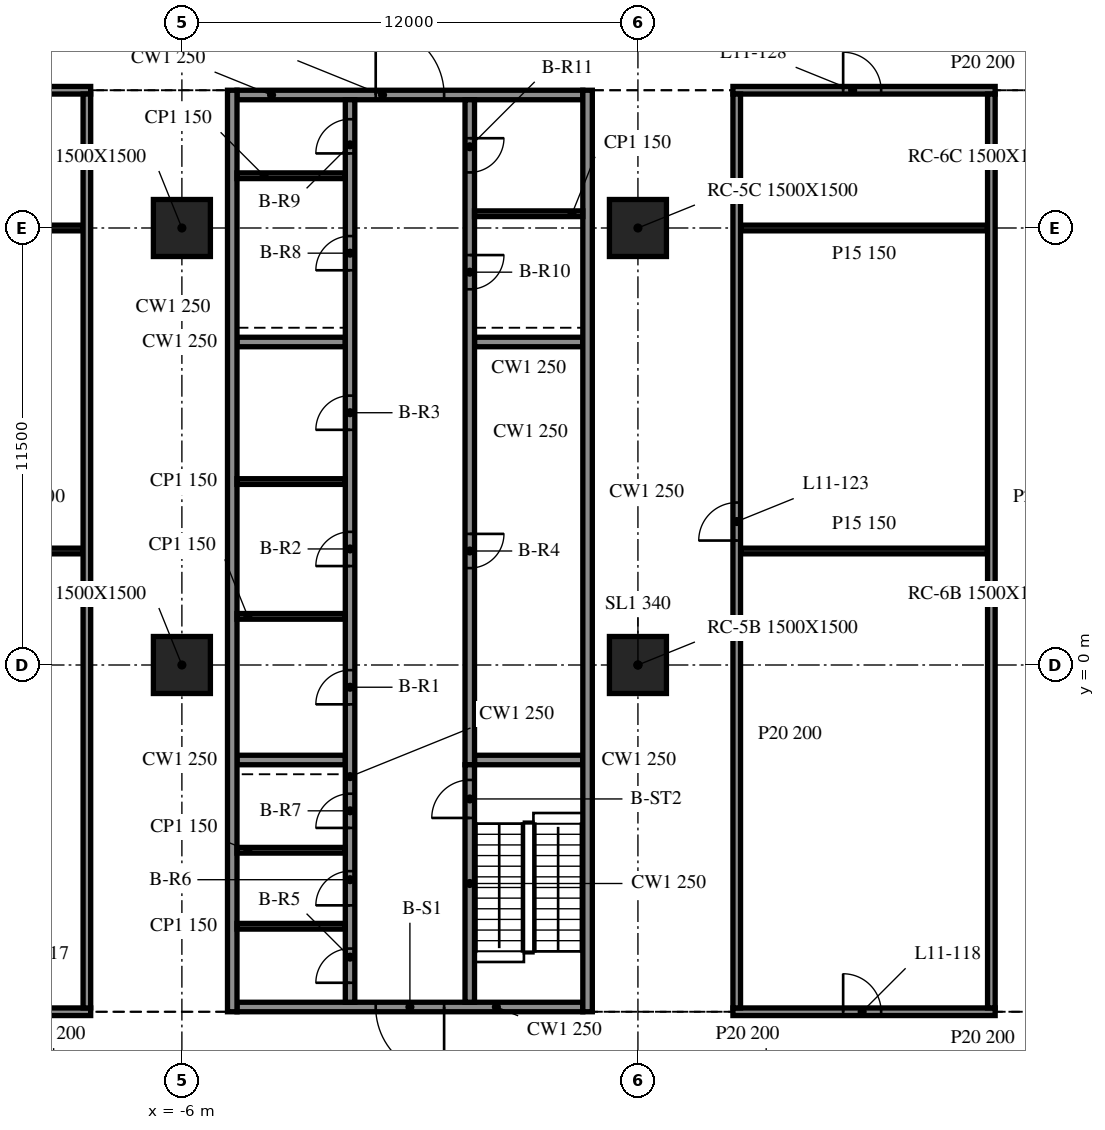
"""IFC4 building model, lengths in metres.
Left out: names, types, materials, properties, quantities, classifications, styles, units other than length and angle.
Written with IfcOpenShell. Run it as: python <this file> out.ifc"""

import sys

from ifc_helpers import new_model, si_unit, direction, frame, frame_2d, origin, origin_2d, place, context, subcontext, project, spatial, rectangle, extrude, element, fill, save


model = new_model("IFC4")
c1 = context("Model", 3, precision=1e-05, world=origin(), true_north=direction((0.0, 1.0)))
c2 = subcontext(c1, "Body", "Model", "MODEL_VIEW")
j1 = project(units=[si_unit("LENGTHUNIT", "METRE"), si_unit("PLANEANGLEUNIT", "RADIAN")], contexts=[c1])
p1 = place(None, origin())
s1 = spatial("IfcSite", under=j1, at=p1, CompositionType="ELEMENT")
p2 = place(p1, origin())
s2 = spatial("IfcBuilding", under=s1, at=p2, CompositionType="ELEMENT")
p3 = place(p2, frame((0.0, 0.0, 50.3)))
s3 = spatial("IfcBuildingStorey", under=s2, at=p3, CompositionType="ELEMENT", Elevation=50.3)
for number, where, z_axis, x_axis in (
    (1, (-6.0, 0.0, -0.34), (0.0, 0.0, 1.0), (1.0, 0.0, 0.0)),
    (2, (-6.0, 11.5, -0.34), (0.0, 0.0, 1.0), (1.0, 0.0, 0.0)),
    (3, (6.0, 0.0, -0.34), (0.0, 0.0, 1.0), (1.0, 0.0, 0.0)),
    (4, (6.0, 11.5, -0.34), (0.0, 0.0, 1.0), (1.0, 0.0, 0.0)),
):
    element("IfcColumn", number, at=place(p3, frame(where, z_axis=z_axis, x_axis=x_axis)), inside=s3, PredefinedType="COLUMN", context=c2, shape_type="SweptSolid", body=[
        extrude(rectangle(XDim=1.5, YDim=1.5, at=origin_2d()), origin(), (0.0, 0.0, 1.0), 4.3),
    ])
for number, where, z_axis, x_axis in (
    (5, (-4.675, 15.125, 0.0), (0.0, 0.0, 1.0), (0.0, -1.0, 0.0)),
    (6, (4.675, -9.125, 0.0), (0.0, 0.0, 1.0), (0.0, 1.0, 0.0)),
):
    element("IfcWall", number, at=place(p3, frame(where, z_axis=z_axis, x_axis=x_axis)), inside=s3, PredefinedType="SOLIDWALL", context=c2, shape_type="SweptSolid", body=[
        extrude(rectangle(XDim=24.25, YDim=0.25, at=frame_2d((12.125, 0.0))), origin(), (0.0, 0.0, 1.0), 3.96),
    ])
p4 = place(p3, frame((4.55, -9.0, 0.0), z_axis=(0.0, 0.0, 1.0), x_axis=(-1.0, 0.0, 0.0)))
e7 = element("IfcWall", 7, at=p4, inside=s3, PredefinedType="SOLIDWALL", context=c2, shape_type="SweptSolid", body=[
    extrude(rectangle(XDim=9.1, YDim=0.25, at=frame_2d((4.55, 0.0))), origin(), (0.0, 0.0, 1.0), 3.96),
])
p5 = place(p4, frame((3.65, 0.0, 0.0)))
e8 = element("IfcOpeningElement", 8, at=p5, cuts=e7, PredefinedType="OPENING", context=c2, shape_type="SweptSolid", body=[
    extrude(rectangle(XDim=1.8, YDim=2.1, at=frame_2d((0.9, 1.05))), frame((0.0, 0.135, 0.0), z_axis=(0.0, -1.0, 0.0), x_axis=(1.0, 0.0, 0.0)), (0.0, 0.0, 1.0), 0.27),
])
p6 = place(p3, frame((-4.55, 15.0, 0.0), z_axis=(0.0, 0.0, 1.0), x_axis=(1.0, 0.0, 0.0)))
e9 = element("IfcWall", 9, at=p6, inside=s3, PredefinedType="SOLIDWALL", context=c2, shape_type="SweptSolid", body=[
    extrude(rectangle(XDim=9.1, YDim=0.25, at=frame_2d((4.55, 0.0))), origin(), (0.0, 0.0, 1.0), 3.96),
])
p7 = place(p6, frame((3.65, 0.0, 0.0)))
e10 = element("IfcOpeningElement", 10, at=p7, cuts=e9, PredefinedType="OPENING", context=c2, shape_type="SweptSolid", body=[
    extrude(rectangle(XDim=1.8, YDim=2.1, at=frame_2d((0.9, 1.05))), frame((0.0, 0.135, 0.0), z_axis=(0.0, -1.0, 0.0), x_axis=(1.0, 0.0, 0.0)), (0.0, 0.0, 1.0), 0.27),
])
p8 = place(p3, frame((-1.575, -8.875, 0.0), z_axis=(0.0, 0.0, 1.0), x_axis=(0.0, 1.0, 0.0)))
e11 = element("IfcWall", 11, at=p8, inside=s3, PredefinedType="SOLIDWALL", context=c2, shape_type="SweptSolid", body=[
    extrude(rectangle(XDim=23.75, YDim=0.25, at=frame_2d((11.875, 0.0))), origin(), (0.0, 0.0, 1.0), 3.96),
])
p9 = place(p8, frame((7.84, 0.0, 0.0)))
e12 = element("IfcOpeningElement", 12, at=p9, cuts=e11, PredefinedType="OPENING", context=c2, shape_type="SweptSolid", body=[
    extrude(rectangle(XDim=0.9, YDim=2.1, at=frame_2d((0.45, 1.05))), frame((0.0, 0.135, 0.0), z_axis=(0.0, -1.0, 0.0), x_axis=(1.0, 0.0, 0.0)), (0.0, 0.0, 1.0), 0.27),
])
p10 = place(p8, frame((11.479, 0.0, 0.0)))
e13 = element("IfcOpeningElement", 13, at=p10, cuts=e11, PredefinedType="OPENING", context=c2, shape_type="SweptSolid", body=[
    extrude(rectangle(XDim=0.9, YDim=2.1, at=frame_2d((0.45, 1.05))), frame((0.0, 0.135, 0.0), z_axis=(0.0, -1.0, 0.0), x_axis=(1.0, 0.0, 0.0)), (0.0, 0.0, 1.0), 0.27),
])
p11 = place(p8, frame((15.064, 0.0, 0.0)))
e14 = element("IfcOpeningElement", 14, at=p11, cuts=e11, PredefinedType="OPENING", context=c2, shape_type="SweptSolid", body=[
    extrude(rectangle(XDim=0.9, YDim=2.1, at=frame_2d((0.45, 1.05))), frame((0.0, 0.135, 0.0), z_axis=(0.0, -1.0, 0.0), x_axis=(1.0, 0.0, 0.0)), (0.0, 0.0, 1.0), 0.27),
])
p12 = place(p8, frame((0.512, 0.0, 0.0)))
e15 = element("IfcOpeningElement", 15, at=p12, cuts=e11, PredefinedType="OPENING", context=c2, shape_type="SweptSolid", body=[
    extrude(rectangle(XDim=0.9, YDim=2.1, at=frame_2d((0.45, 1.05))), frame((0.0, 0.135, 0.0), z_axis=(0.0, -1.0, 0.0), x_axis=(1.0, 0.0, 0.0)), (0.0, 0.0, 1.0), 0.27),
])
p13 = place(p8, frame((2.55, 0.0, 0.0)))
e16 = element("IfcOpeningElement", 16, at=p13, cuts=e11, PredefinedType="OPENING", context=c2, shape_type="SweptSolid", body=[
    extrude(rectangle(XDim=0.9, YDim=2.1, at=frame_2d((0.45, 1.05))), frame((0.0, 0.135, 0.0), z_axis=(0.0, -1.0, 0.0), x_axis=(1.0, 0.0, 0.0)), (0.0, 0.0, 1.0), 0.27),
])
p14 = place(p8, frame((4.587, 0.0, 0.0)))
e17 = element("IfcOpeningElement", 17, at=p14, cuts=e11, PredefinedType="OPENING", context=c2, shape_type="SweptSolid", body=[
    extrude(rectangle(XDim=0.9, YDim=2.1, at=frame_2d((0.45, 1.05))), frame((0.0, 0.135, 0.0), z_axis=(0.0, -1.0, 0.0), x_axis=(1.0, 0.0, 0.0)), (0.0, 0.0, 1.0), 0.27),
])
p15 = place(p8, frame((19.262, 0.0, 0.0)))
e18 = element("IfcOpeningElement", 18, at=p15, cuts=e11, PredefinedType="OPENING", context=c2, shape_type="SweptSolid", body=[
    extrude(rectangle(XDim=0.9, YDim=2.1, at=frame_2d((0.45, 1.05))), frame((0.0, 0.135, 0.0), z_axis=(0.0, -1.0, 0.0), x_axis=(1.0, 0.0, 0.0)), (0.0, 0.0, 1.0), 0.27),
])
p16 = place(p8, frame((22.337, 0.0, 0.0)))
e19 = element("IfcOpeningElement", 19, at=p16, cuts=e11, PredefinedType="OPENING", context=c2, shape_type="SweptSolid", body=[
    extrude(rectangle(XDim=0.9, YDim=2.1, at=frame_2d((0.45, 1.05))), frame((0.0, 0.135, 0.0), z_axis=(0.0, -1.0, 0.0), x_axis=(1.0, 0.0, 0.0)), (0.0, 0.0, 1.0), 0.27),
])
p17 = place(p3, frame((1.575, -8.875, 0.0), z_axis=(0.0, 0.0, 1.0), x_axis=(0.0, 1.0, 0.0)))
e20 = element("IfcWall", 20, at=p17, inside=s3, PredefinedType="SOLIDWALL", context=c2, shape_type="SweptSolid", body=[
    extrude(rectangle(XDim=6.25, YDim=0.25, at=frame_2d((3.125, 0.0))), origin(), (0.0, 0.0, 1.0), 3.96),
])
p18 = place(p17, frame((4.85, 0.0, 0.0)))
e21 = element("IfcOpeningElement", 21, at=p18, cuts=e20, PredefinedType="OPENING", context=c2, shape_type="SweptSolid", body=[
    extrude(rectangle(XDim=1.0, YDim=2.1, at=frame_2d((0.5, 1.05))), frame((0.0, 0.135, 0.0), z_axis=(0.0, -1.0, 0.0), x_axis=(1.0, 0.0, 0.0)), (0.0, 0.0, 1.0), 0.27),
])
p19 = place(p3, frame((1.575, 14.875, 0.0), z_axis=(0.0, 0.0, 1.0), x_axis=(0.0, -1.0, 0.0)))
e22 = element("IfcWall", 22, at=p19, inside=s3, PredefinedType="SOLIDWALL", context=c2, shape_type="SweptSolid", body=[
    extrude(rectangle(XDim=17.5, YDim=0.25, at=frame_2d((8.75, 0.0))), origin(), (0.0, 0.0, 1.0), 3.96),
])
p20 = place(p19, frame((11.425, 0.0, 0.0)))
e23 = element("IfcOpeningElement", 23, at=p20, cuts=e22, PredefinedType="OPENING", context=c2, shape_type="SweptSolid", body=[
    extrude(rectangle(XDim=0.9, YDim=2.1, at=frame_2d((0.45, 1.05))), frame((0.0, 0.135, 0.0), z_axis=(0.0, -1.0, 0.0), x_axis=(1.0, 0.0, 0.0)), (0.0, 0.0, 1.0), 0.27),
])
p21 = place(p19, frame((4.087, 0.0, 0.0)))
e24 = element("IfcOpeningElement", 24, at=p21, cuts=e22, PredefinedType="OPENING", context=c2, shape_type="SweptSolid", body=[
    extrude(rectangle(XDim=0.9, YDim=2.1, at=frame_2d((0.45, 1.05))), frame((0.0, 0.135, 0.0), z_axis=(0.0, -1.0, 0.0), x_axis=(1.0, 0.0, 0.0)), (0.0, 0.0, 1.0), 0.27),
])
p22 = place(p19, frame((1.012, 0.0, 0.0)))
e25 = element("IfcOpeningElement", 25, at=p22, cuts=e22, PredefinedType="OPENING", context=c2, shape_type="SweptSolid", body=[
    extrude(rectangle(XDim=0.9, YDim=2.1, at=frame_2d((0.45, 1.05))), frame((0.0, 0.135, 0.0), z_axis=(0.0, -1.0, 0.0), x_axis=(1.0, 0.0, 0.0)), (0.0, 0.0, 1.0), 0.27),
])
for number, where, z_axis, x_axis in (
    (26, (-4.55, -2.5, 0.0), (0.0, 0.0, 1.0), (1.0, 0.0, 0.0)),
    (27, (-4.55, 8.5, 0.0), (0.0, 0.0, 1.0), (1.0, 0.0, 0.0)),
    (28, (1.7, -2.5, 0.0), (0.0, 0.0, 1.0), (1.0, 0.0, 0.0)),
    (29, (1.7, 8.5, 0.0), (0.0, 0.0, 1.0), (1.0, 0.0, 0.0)),
):
    element("IfcWall", number, at=place(p3, frame(where, z_axis=z_axis, x_axis=x_axis)), inside=s3, PredefinedType="SOLIDWALL", context=c2, shape_type="SweptSolid", body=[
        extrude(rectangle(XDim=2.85, YDim=0.25, at=frame_2d((1.425, 0.0))), origin(), (0.0, 0.0, 1.0), 3.96),
    ])
for number, where, z_axis, x_axis in (
    (30, (-4.55, 1.28, 0.0), (0.0, 0.0, 1.0), (1.0, 0.0, 0.0)),
    (31, (-4.55, 4.827, 0.0), (0.0, 0.0, 1.0), (1.0, 0.0, 0.0)),
    (32, (-4.55, -6.875, 0.0), (0.0, 0.0, 1.0), (1.0, 0.0, 0.0)),
    (33, (-4.55, -4.875, 0.0), (0.0, 0.0, 1.0), (1.0, 0.0, 0.0)),
    (34, (-4.55, 12.875, 0.0), (0.0, 0.0, 1.0), (1.0, 0.0, 0.0)),
    (35, (1.7, 11.875, 0.0), (0.0, 0.0, 1.0), (1.0, 0.0, 0.0)),
):
    element("IfcWall", number, at=place(p3, frame(where, z_axis=z_axis, x_axis=x_axis)), inside=s3, PredefinedType="PARTITIONING", context=c2, shape_type="SweptSolid", body=[
        extrude(rectangle(XDim=2.85, YDim=0.15, at=frame_2d((1.425, 0.0))), origin(), (0.0, 0.0, 1.0), 3.96),
    ])
p23 = place(p3, frame((-15.7, -9.125, 0.0), z_axis=(0.0, 0.0, 1.0), x_axis=(1.0, 0.0, 0.0)))
e36 = element("IfcWall", 36, at=p23, inside=s3, PredefinedType="PARTITIONING", context=c2, shape_type="SweptSolid", body=[
    extrude(rectangle(XDim=7.3, YDim=0.2, at=frame_2d((3.65, 0.0))), origin(), (0.0, 0.0, 1.0), 3.96),
])
p24 = place(p23, frame((3.1, 0.0, 0.0)))
e37 = element("IfcOpeningElement", 37, at=p24, cuts=e36, PredefinedType="OPENING", context=c2, shape_type="SweptSolid", body=[
    extrude(rectangle(XDim=1.0, YDim=2.1, at=frame_2d((0.5, 1.05))), frame((0.0, 0.11, 0.0), z_axis=(0.0, -1.0, 0.0), x_axis=(1.0, 0.0, 0.0)), (0.0, 0.0, 1.0), 0.22),
])
p25 = place(p3, frame((8.5, -9.125, 0.0), z_axis=(0.0, 0.0, 1.0), x_axis=(1.0, 0.0, 0.0)))
e38 = element("IfcWall", 38, at=p25, inside=s3, PredefinedType="PARTITIONING", context=c2, shape_type="SweptSolid", body=[
    extrude(rectangle(XDim=6.9, YDim=0.2, at=frame_2d((3.45, 0.0))), origin(), (0.0, 0.0, 1.0), 3.96),
])
p26 = place(p25, frame((2.9, 0.0, 0.0)))
e39 = element("IfcOpeningElement", 39, at=p26, cuts=e38, PredefinedType="OPENING", context=c2, shape_type="SweptSolid", body=[
    extrude(rectangle(XDim=1.0, YDim=2.1, at=frame_2d((0.5, 1.05))), frame((0.0, 0.11, 0.0), z_axis=(0.0, -1.0, 0.0), x_axis=(1.0, 0.0, 0.0)), (0.0, 0.0, 1.0), 0.22),
])
p27 = place(p3, frame((-15.5, 3.0, 0.0), z_axis=(0.0, 0.0, 1.0), x_axis=(1.0, 0.0, 0.0)))
e40 = element("IfcWall", 40, at=p27, inside=s3, PredefinedType="PARTITIONING", context=c2, shape_type="SweptSolid", body=[
    extrude(rectangle(XDim=6.9, YDim=0.15, at=frame_2d((3.45, 0.0))), origin(), (0.0, 0.0, 1.0), 3.96),
])
p28 = place(p3, frame((8.7, 3.0, 0.0), z_axis=(0.0, 0.0, 1.0), x_axis=(1.0, 0.0, 0.0)))
e41 = element("IfcWall", 41, at=p28, inside=s3, PredefinedType="PARTITIONING", context=c2, shape_type="SweptSolid", body=[
    extrude(rectangle(XDim=6.5, YDim=0.15, at=frame_2d((3.25, 0.0))), origin(), (0.0, 0.0, 1.0), 3.96),
])
p29 = place(p3, frame((-15.5, 11.5, 0.0), z_axis=(0.0, 0.0, 1.0), x_axis=(1.0, 0.0, 0.0)))
e42 = element("IfcWall", 42, at=p29, inside=s3, PredefinedType="PARTITIONING", context=c2, shape_type="SweptSolid", body=[
    extrude(rectangle(XDim=6.9, YDim=0.15, at=frame_2d((3.45, 0.0))), origin(), (0.0, 0.0, 1.0), 3.96),
])
p30 = place(p3, frame((8.7, 11.5, 0.0), z_axis=(0.0, 0.0, 1.0), x_axis=(1.0, 0.0, 0.0)))
e43 = element("IfcWall", 43, at=p30, inside=s3, PredefinedType="PARTITIONING", context=c2, shape_type="SweptSolid", body=[
    extrude(rectangle(XDim=6.5, YDim=0.15, at=frame_2d((3.25, 0.0))), origin(), (0.0, 0.0, 1.0), 3.96),
])
p31 = place(p3, frame((-15.7, 15.125, 0.0), z_axis=(0.0, 0.0, 1.0), x_axis=(1.0, 0.0, 0.0)))
e44 = element("IfcWall", 44, at=p31, inside=s3, PredefinedType="PARTITIONING", context=c2, shape_type="SweptSolid", body=[
    extrude(rectangle(XDim=7.3, YDim=0.2, at=frame_2d((3.65, 0.0))), origin(), (0.0, 0.0, 1.0), 3.96),
])
p32 = place(p31, frame((3.1, 0.0, 0.0)))
e45 = element("IfcOpeningElement", 45, at=p32, cuts=e44, PredefinedType="OPENING", context=c2, shape_type="SweptSolid", body=[
    extrude(rectangle(XDim=1.0, YDim=2.1, at=frame_2d((0.5, 1.05))), frame((0.0, 0.11, 0.0), z_axis=(0.0, -1.0, 0.0), x_axis=(1.0, 0.0, 0.0)), (0.0, 0.0, 1.0), 0.22),
])
p33 = place(p3, frame((8.5, 15.125, 0.0), z_axis=(0.0, 0.0, 1.0), x_axis=(1.0, 0.0, 0.0)))
e46 = element("IfcWall", 46, at=p33, inside=s3, PredefinedType="PARTITIONING", context=c2, shape_type="SweptSolid", body=[
    extrude(rectangle(XDim=6.9, YDim=0.2, at=frame_2d((3.45, 0.0))), origin(), (0.0, 0.0, 1.0), 3.96),
])
p34 = place(p33, frame((2.9, 0.0, 0.0)))
e47 = element("IfcOpeningElement", 47, at=p34, cuts=e46, PredefinedType="OPENING", context=c2, shape_type="SweptSolid", body=[
    extrude(rectangle(XDim=1.0, YDim=2.1, at=frame_2d((0.5, 1.05))), frame((0.0, 0.11, 0.0), z_axis=(0.0, -1.0, 0.0), x_axis=(1.0, 0.0, 0.0)), (0.0, 0.0, 1.0), 0.22),
])
p35 = place(p3, frame((-8.5, -9.025, 0.0), z_axis=(0.0, 0.0, 1.0), x_axis=(0.0, 1.0, 0.0)))
e48 = element("IfcWall", 48, at=p35, inside=s3, PredefinedType="PARTITIONING", context=c2, shape_type="SweptSolid", body=[
    extrude(rectangle(XDim=24.05, YDim=0.2, at=frame_2d((12.025, 0.0))), origin(), (0.0, 0.0, 1.0), 3.96),
])
p36 = place(p3, frame((8.6, -9.025, 0.0), z_axis=(0.0, 0.0, 1.0), x_axis=(0.0, 1.0, 0.0)))
e49 = element("IfcWall", 49, at=p36, inside=s3, PredefinedType="PARTITIONING", context=c2, shape_type="SweptSolid", body=[
    extrude(rectangle(XDim=24.05, YDim=0.2, at=frame_2d((12.025, 0.0))), origin(), (0.0, 0.0, 1.0), 3.96),
])
p37 = place(p36, frame((12.3, 0.0, 0.0)))
e50 = element("IfcOpeningElement", 50, at=p37, cuts=e49, PredefinedType="OPENING", context=c2, shape_type="SweptSolid", body=[
    extrude(rectangle(XDim=1.0, YDim=2.1, at=frame_2d((0.5, 1.05))), frame((0.0, 0.11, 0.0), z_axis=(0.0, -1.0, 0.0), x_axis=(1.0, 0.0, 0.0)), (0.0, 0.0, 1.0), 0.22),
])
p38 = place(p3, frame((15.3, -9.025, 0.0), z_axis=(0.0, 0.0, 1.0), x_axis=(0.0, 1.0, 0.0)))
e51 = element("IfcWall", 51, at=p38, inside=s3, PredefinedType="PARTITIONING", context=c2, shape_type="SweptSolid", body=[
    extrude(rectangle(XDim=24.05, YDim=0.2, at=frame_2d((12.025, 0.0))), origin(), (0.0, 0.0, 1.0), 3.96),
])
p39 = place(p5, origin())
e52 = element("IfcDoor", 52, at=p39, inside=s3, OperationType="DOUBLE_DOOR_SINGLE_SWING", PredefinedType="DOOR", context=c2, shape_type="SweptSolid", body=[
    extrude(rectangle(XDim=1.8, YDim=2.1, at=frame_2d((0.9, 1.05))), frame((0.0, 0.025, 0.0), z_axis=(0.0, -1.0, 0.0), x_axis=(1.0, 0.0, 0.0)), (0.0, 0.0, 1.0), 0.05),
])
fill(e8, e52)
p40 = place(p7, origin())
e53 = element("IfcDoor", 53, at=p40, inside=s3, OperationType="DOUBLE_DOOR_SINGLE_SWING", PredefinedType="DOOR", context=c2, shape_type="SweptSolid", body=[
    extrude(rectangle(XDim=1.8, YDim=2.1, at=frame_2d((0.9, 1.05))), frame((0.0, 0.025, 0.0), z_axis=(0.0, -1.0, 0.0), x_axis=(1.0, 0.0, 0.0)), (0.0, 0.0, 1.0), 0.05),
])
fill(e10, e53)
p41 = place(p9, origin())
e54 = element("IfcDoor", 54, at=p41, inside=s3, OperationType="SINGLE_SWING_LEFT", PredefinedType="DOOR", context=c2, shape_type="SweptSolid", body=[
    extrude(rectangle(XDim=0.9, YDim=2.1, at=frame_2d((0.45, 1.05))), frame((0.0, 0.025, 0.0), z_axis=(0.0, -1.0, 0.0), x_axis=(1.0, 0.0, 0.0)), (0.0, 0.0, 1.0), 0.05),
])
fill(e12, e54)
p42 = place(p10, origin())
e55 = element("IfcDoor", 55, at=p42, inside=s3, OperationType="SINGLE_SWING_RIGHT", PredefinedType="DOOR", context=c2, shape_type="SweptSolid", body=[
    extrude(rectangle(XDim=0.9, YDim=2.1, at=frame_2d((0.45, 1.05))), frame((0.0, 0.025, 0.0), z_axis=(0.0, -1.0, 0.0), x_axis=(1.0, 0.0, 0.0)), (0.0, 0.0, 1.0), 0.05),
])
fill(e13, e55)
p43 = place(p11, origin())
e56 = element("IfcDoor", 56, at=p43, inside=s3, OperationType="SINGLE_SWING_LEFT", PredefinedType="DOOR", context=c2, shape_type="SweptSolid", body=[
    extrude(rectangle(XDim=0.9, YDim=2.1, at=frame_2d((0.45, 1.05))), frame((0.0, 0.025, 0.0), z_axis=(0.0, -1.0, 0.0), x_axis=(1.0, 0.0, 0.0)), (0.0, 0.0, 1.0), 0.05),
])
fill(e14, e56)
p44 = place(p20, origin())
e57 = element("IfcDoor", 57, at=p44, inside=s3, OperationType="SINGLE_SWING_RIGHT", PredefinedType="DOOR", context=c2, shape_type="SweptSolid", body=[
    extrude(rectangle(XDim=0.9, YDim=2.1, at=frame_2d((0.45, 1.05))), frame((0.0, 0.025, 0.0), z_axis=(0.0, -1.0, 0.0), x_axis=(1.0, 0.0, 0.0)), (0.0, 0.0, 1.0), 0.05),
])
fill(e23, e57)
p45 = place(p12, origin())
e58 = element("IfcDoor", 58, at=p45, inside=s3, OperationType="SINGLE_SWING_LEFT", PredefinedType="DOOR", context=c2, shape_type="SweptSolid", body=[
    extrude(rectangle(XDim=0.9, YDim=2.1, at=frame_2d((0.45, 1.05))), frame((0.0, 0.025, 0.0), z_axis=(0.0, -1.0, 0.0), x_axis=(1.0, 0.0, 0.0)), (0.0, 0.0, 1.0), 0.05),
])
fill(e15, e58)
p46 = place(p13, origin())
e59 = element("IfcDoor", 59, at=p46, inside=s3, OperationType="SINGLE_SWING_RIGHT", PredefinedType="DOOR", context=c2, shape_type="SweptSolid", body=[
    extrude(rectangle(XDim=0.9, YDim=2.1, at=frame_2d((0.45, 1.05))), frame((0.0, 0.025, 0.0), z_axis=(0.0, -1.0, 0.0), x_axis=(1.0, 0.0, 0.0)), (0.0, 0.0, 1.0), 0.05),
])
fill(e16, e59)
p47 = place(p14, origin())
e60 = element("IfcDoor", 60, at=p47, inside=s3, OperationType="SINGLE_SWING_LEFT", PredefinedType="DOOR", context=c2, shape_type="SweptSolid", body=[
    extrude(rectangle(XDim=0.9, YDim=2.1, at=frame_2d((0.45, 1.05))), frame((0.0, 0.025, 0.0), z_axis=(0.0, -1.0, 0.0), x_axis=(1.0, 0.0, 0.0)), (0.0, 0.0, 1.0), 0.05),
])
fill(e17, e60)
p48 = place(p15, origin())
e61 = element("IfcDoor", 61, at=p48, inside=s3, OperationType="SINGLE_SWING_RIGHT", PredefinedType="DOOR", context=c2, shape_type="SweptSolid", body=[
    extrude(rectangle(XDim=0.9, YDim=2.1, at=frame_2d((0.45, 1.05))), frame((0.0, 0.025, 0.0), z_axis=(0.0, -1.0, 0.0), x_axis=(1.0, 0.0, 0.0)), (0.0, 0.0, 1.0), 0.05),
])
fill(e18, e61)
p49 = place(p16, origin())
e62 = element("IfcDoor", 62, at=p49, inside=s3, OperationType="SINGLE_SWING_LEFT", PredefinedType="DOOR", context=c2, shape_type="SweptSolid", body=[
    extrude(rectangle(XDim=0.9, YDim=2.1, at=frame_2d((0.45, 1.05))), frame((0.0, 0.025, 0.0), z_axis=(0.0, -1.0, 0.0), x_axis=(1.0, 0.0, 0.0)), (0.0, 0.0, 1.0), 0.05),
])
fill(e19, e62)
p50 = place(p21, origin())
e63 = element("IfcDoor", 63, at=p50, inside=s3, OperationType="SINGLE_SWING_RIGHT", PredefinedType="DOOR", context=c2, shape_type="SweptSolid", body=[
    extrude(rectangle(XDim=0.9, YDim=2.1, at=frame_2d((0.45, 1.05))), frame((0.0, 0.025, 0.0), z_axis=(0.0, -1.0, 0.0), x_axis=(1.0, 0.0, 0.0)), (0.0, 0.0, 1.0), 0.05),
])
fill(e24, e63)
p51 = place(p22, origin())
e64 = element("IfcDoor", 64, at=p51, inside=s3, OperationType="SINGLE_SWING_LEFT", PredefinedType="DOOR", context=c2, shape_type="SweptSolid", body=[
    extrude(rectangle(XDim=0.9, YDim=2.1, at=frame_2d((0.45, 1.05))), frame((0.0, 0.025, 0.0), z_axis=(0.0, -1.0, 0.0), x_axis=(1.0, 0.0, 0.0)), (0.0, 0.0, 1.0), 0.05),
])
fill(e25, e64)
p52 = place(p18, origin())
e65 = element("IfcDoor", 65, at=p52, inside=s3, OperationType="SINGLE_SWING_RIGHT", PredefinedType="DOOR", context=c2, shape_type="SweptSolid", body=[
    extrude(rectangle(XDim=1.0, YDim=2.1, at=frame_2d((0.5, 1.05))), frame((0.0, 0.025, 0.0), z_axis=(0.0, -1.0, 0.0), x_axis=(1.0, 0.0, 0.0)), (0.0, 0.0, 1.0), 0.05),
])
fill(e21, e65)
p53 = place(p26, origin())
e66 = element("IfcDoor", 66, at=p53, inside=s3, OperationType="SINGLE_SWING_LEFT", PredefinedType="DOOR", context=c2, shape_type="SweptSolid", body=[
    extrude(rectangle(XDim=1.0, YDim=2.1, at=frame_2d((0.5, 1.05))), frame((0.0, 0.025, 0.0), z_axis=(0.0, -1.0, 0.0), x_axis=(1.0, 0.0, 0.0)), (0.0, 0.0, 1.0), 0.05),
])
fill(e39, e66)
p54 = place(p37, origin())
e67 = element("IfcDoor", 67, at=p54, inside=s3, OperationType="SINGLE_SWING_LEFT", PredefinedType="DOOR", context=c2, shape_type="SweptSolid", body=[
    extrude(rectangle(XDim=1.0, YDim=2.1, at=frame_2d((0.5, 1.05))), frame((0.0, 0.025, 0.0), z_axis=(0.0, -1.0, 0.0), x_axis=(1.0, 0.0, 0.0)), (0.0, 0.0, 1.0), 0.05),
])
fill(e50, e67)
p55 = place(p34, origin())
e68 = element("IfcDoor", 68, at=p55, inside=s3, OperationType="SINGLE_SWING_RIGHT", PredefinedType="DOOR", context=c2, shape_type="SweptSolid", body=[
    extrude(rectangle(XDim=1.0, YDim=2.1, at=frame_2d((0.5, 1.05))), frame((0.0, 0.025, 0.0), z_axis=(0.0, -1.0, 0.0), x_axis=(1.0, 0.0, 0.0)), (0.0, 0.0, 1.0), 0.05),
])
fill(e47, e68)
save(model, sys.argv[1])
